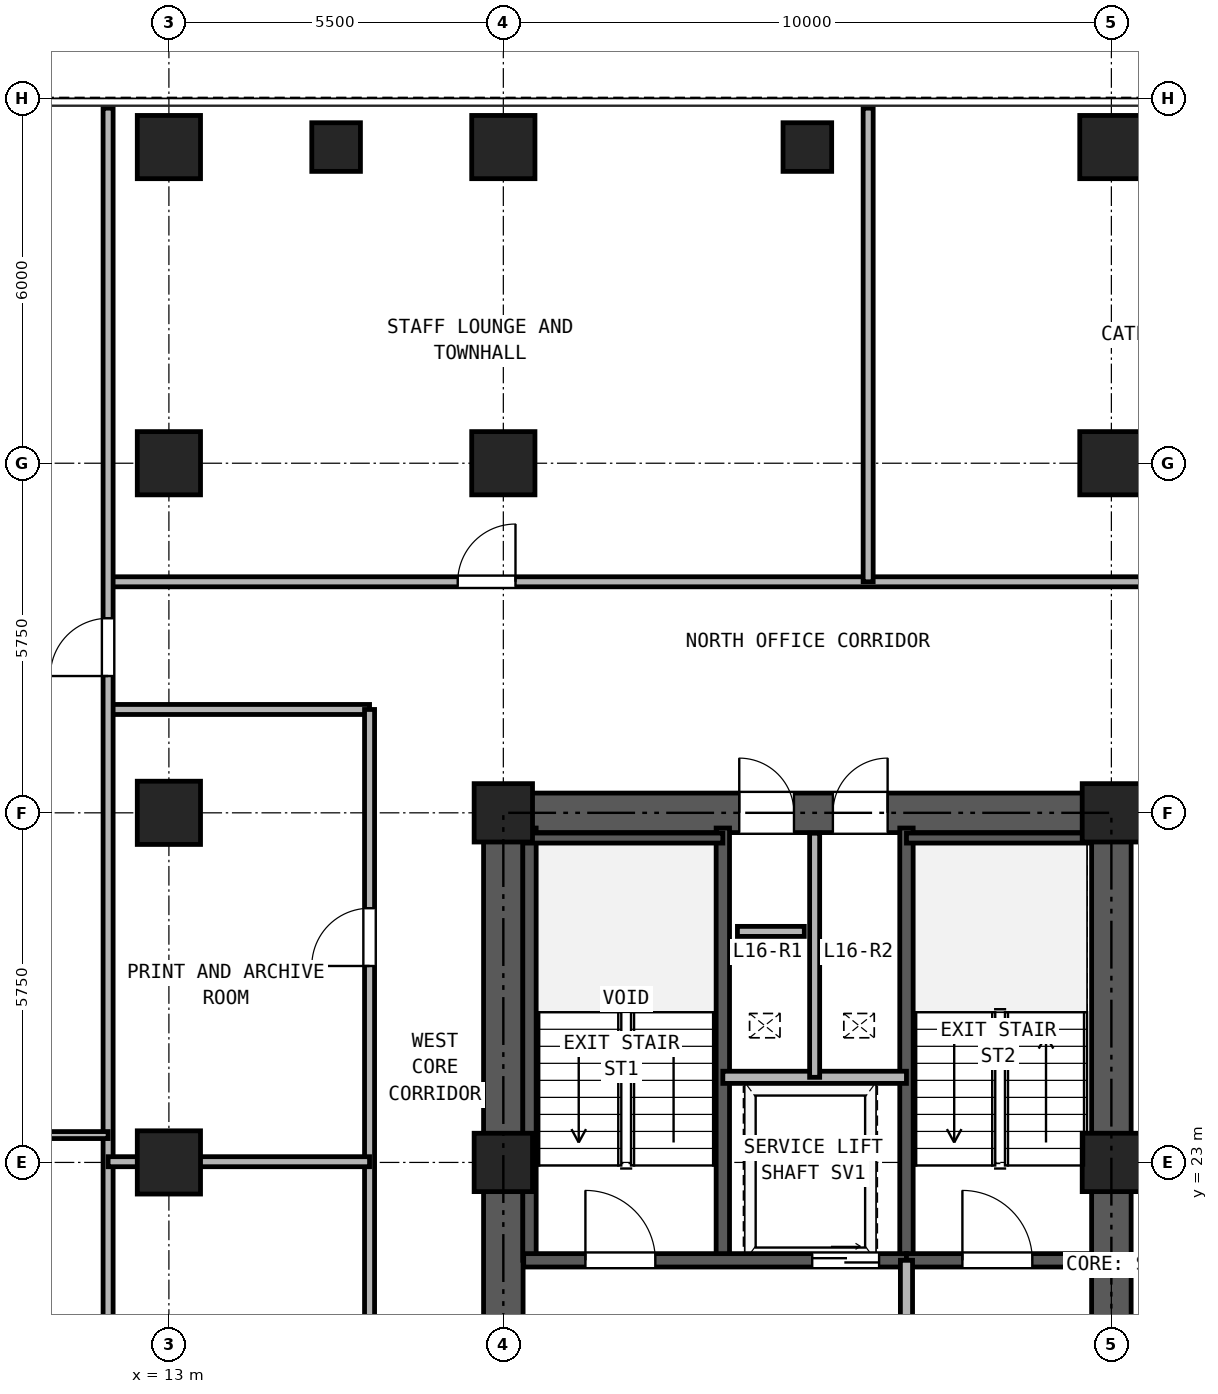
"""IFC4 building model, lengths in metres.
Left out: names, types, materials, properties, quantities, classifications, styles, units other than length and angle.
Written with IfcOpenShell. Run it as: python <this file> out.ifc"""

import sys

from ifc_helpers import new_model, si_unit, direction, frame, frame_2d, origin, origin_2d, place, context, subcontext, project, spatial, rectangle, hollow_rectangle, extrude, source, transform, mapped, element, fill, save


model = new_model("IFC4")
c1 = context("Model", 3, precision=1e-05, world=origin(), true_north=direction((0.0, 1.0)))
c2 = subcontext(c1, "Body", "Model", "MODEL_VIEW")
j1 = project(units=[si_unit("LENGTHUNIT", "METRE"), si_unit("PLANEANGLEUNIT", "RADIAN")], contexts=[c1])
p1 = place(None, origin())
s1 = spatial("IfcSite", under=j1, at=p1, CompositionType="ELEMENT")
p2 = place(p1, origin())
s2 = spatial("IfcBuilding", under=s1, at=p2, CompositionType="ELEMENT")
p3 = place(p2, frame((0.0, 0.0, 62.1)))
s3 = spatial("IfcBuildingStorey", under=s2, at=p3, CompositionType="ELEMENT", Elevation=62.1)
m1 = source(origin(), c2, "Body", "SweptSolid", [
    extrude(hollow_rectangle(XDim=1.04, YDim=1.04, WallThickness=0.065, at=origin_2d()), origin(), (0.0, 0.0, 1.0), 3.32),
])
for number, where, z_axis, x_axis in (
    (1, (13.0, 39.7, 0.0), (0.0, 0.0, 1.0), (1.0, 0.0, 0.0)),
    (2, (18.5, 39.7, 0.0), (0.0, 0.0, 1.0), (1.0, 0.0, 0.0)),
    (3, (28.5, 39.7, 0.0), (0.0, 0.0, 1.0), (1.0, 0.0, 0.0)),
    (4, (13.0, 23.0, 0.0), (0.0, 0.0, 1.0), (1.0, 0.0, 0.0)),
    (5, (13.0, 28.75, 0.0), (0.0, 0.0, 1.0), (1.0, 0.0, 0.0)),
    (6, (13.0, 34.5, 0.0), (0.0, 0.0, 1.0), (1.0, 0.0, 0.0)),
):
    element("IfcColumn", number, at=place(p3, frame(where, z_axis=z_axis, x_axis=x_axis)), inside=s3, PredefinedType="COLUMN", context=c2, shape_type="MappedRepresentation", body=[
        mapped(m1, transform((0.0, 0.0, 0.0), x_axis=(1.0, 0.0, 0.0), y_axis=(0.0, 1.0, 0.0), z_axis=(0.0, 0.0, 1.0), scale=1.0)),
    ])
m2 = source(origin(), c2, "Body", "SweptSolid", [
    extrude(hollow_rectangle(XDim=0.96, YDim=0.96, WallThickness=0.06, at=origin_2d()), origin(), (0.0, 0.0, 1.0), 3.32),
])
for number, where, z_axis, x_axis in (
    (7, (18.5, 23.0, 0.0), (0.0, 0.0, 1.0), (1.0, 0.0, 0.0)),
    (8, (18.5, 28.75, 0.0), (0.0, 0.0, 1.0), (1.0, 0.0, 0.0)),
):
    element("IfcColumn", number, at=place(p3, frame(where, z_axis=z_axis, x_axis=x_axis)), inside=s3, PredefinedType="COLUMN", context=c2, shape_type="MappedRepresentation", body=[
        mapped(m2, transform((0.0, 0.0, 0.0), x_axis=(1.0, 0.0, 0.0), y_axis=(0.0, 1.0, 0.0), z_axis=(0.0, 0.0, 1.0), scale=1.0)),
    ])
p4 = place(p3, frame((18.5, 34.5, 0.0), z_axis=(0.0, 0.0, 1.0), x_axis=(1.0, 0.0, 0.0)))
e9 = element("IfcColumn", 9, at=p4, inside=s3, PredefinedType="COLUMN", context=c2, shape_type="MappedRepresentation", body=[
    mapped(m1, transform((0.0, 0.0, 0.0), x_axis=(1.0, 0.0, 0.0), y_axis=(0.0, 1.0, 0.0), z_axis=(0.0, 0.0, 1.0), scale=1.0)),
])
for number, where, z_axis, x_axis in (
    (10, (28.5, 23.0, 0.0), (0.0, 0.0, 1.0), (1.0, 0.0, 0.0)),
    (11, (28.5, 28.75, 0.0), (0.0, 0.0, 1.0), (1.0, 0.0, 0.0)),
):
    element("IfcColumn", number, at=place(p3, frame(where, z_axis=z_axis, x_axis=x_axis)), inside=s3, PredefinedType="COLUMN", context=c2, shape_type="MappedRepresentation", body=[
        mapped(m2, transform((0.0, 0.0, 0.0), x_axis=(1.0, 0.0, 0.0), y_axis=(0.0, 1.0, 0.0), z_axis=(0.0, 0.0, 1.0), scale=1.0)),
    ])
p5 = place(p3, frame((28.5, 34.5, 0.0), z_axis=(0.0, 0.0, 1.0), x_axis=(1.0, 0.0, 0.0)))
e12 = element("IfcColumn", 12, at=p5, inside=s3, PredefinedType="COLUMN", context=c2, shape_type="MappedRepresentation", body=[
    mapped(m1, transform((0.0, 0.0, 0.0), x_axis=(1.0, 0.0, 0.0), y_axis=(0.0, 1.0, 0.0), z_axis=(0.0, 0.0, 1.0), scale=1.0)),
])
m3 = source(origin(), c2, "Body", "SweptSolid", [
    extrude(hollow_rectangle(XDim=0.8, YDim=0.8, WallThickness=0.045, at=origin_2d()), origin(), (0.0, 0.0, 1.0), 3.32),
])
for number, where, z_axis, x_axis in (
    (13, (15.75, 39.7, 0.0), (0.0, 0.0, 1.0), (1.0, 0.0, 0.0)),
    (14, (23.5, 39.7, 0.0), (0.0, 0.0, 1.0), (1.0, 0.0, 0.0)),
):
    element("IfcColumn", number, at=place(p3, frame(where, z_axis=z_axis, x_axis=x_axis)), inside=s3, PredefinedType="COLUMN", context=c2, shape_type="MappedRepresentation", body=[
        mapped(m3, transform((0.0, 0.0, 0.0), x_axis=(1.0, 0.0, 0.0), y_axis=(0.0, 1.0, 0.0), z_axis=(0.0, 0.0, 1.0), scale=1.0)),
    ])
p6 = place(p3, frame((18.175, 28.75, 0.0), z_axis=(0.0, 0.0, 1.0), x_axis=(1.0, 0.0, 0.0)))
e15 = element("IfcWall", 15, at=p6, inside=s3, PredefinedType="SHEAR", context=c2, shape_type="SweptSolid", body=[
    extrude(rectangle(XDim=10.65, YDim=0.65, at=frame_2d((5.325, 0.0))), origin(), (0.0, 0.0, 1.0), 3.32),
])
p7 = place(p6, frame((4.205, 0.0, 0.0)))
e16 = element("IfcOpeningElement", 16, at=p7, cuts=e15, PredefinedType="OPENING", context=c2, shape_type="SweptSolid", body=[
    extrude(rectangle(XDim=0.9, YDim=2.05, at=frame_2d((0.45, 1.025))), frame((0.0, 0.335, 0.0), z_axis=(0.0, -1.0, 0.0), x_axis=(1.0, 0.0, 0.0)), (0.0, 0.0, 1.0), 0.67),
])
p8 = place(p6, frame((5.745, 0.0, 0.0)))
e17 = element("IfcOpeningElement", 17, at=p8, cuts=e15, PredefinedType="OPENING", context=c2, shape_type="SweptSolid", body=[
    extrude(rectangle(XDim=0.9, YDim=2.05, at=frame_2d((0.45, 1.025))), frame((0.0, 0.335, 0.0), z_axis=(0.0, -1.0, 0.0), x_axis=(1.0, 0.0, 0.0)), (0.0, 0.0, 1.0), 0.67),
])
p9 = place(p3, frame((18.5, 11.825, 0.0), z_axis=(0.0, 0.0, 1.0), x_axis=(0.0, 1.0, 0.0)))
e18 = element("IfcWall", 18, at=p9, inside=s3, PredefinedType="SHEAR", context=c2, shape_type="SweptSolid", body=[
    extrude(rectangle(XDim=16.6, YDim=0.65, at=frame_2d((8.3, 0.0))), origin(), (0.0, 0.0, 1.0), 3.32),
])
p10 = place(p9, frame((7.325, 0.0, 0.0)))
e19 = element("IfcOpeningElement", 19, at=p10, cuts=e18, PredefinedType="OPENING", context=c2, shape_type="SweptSolid", body=[
    extrude(rectangle(XDim=1.15, YDim=2.2, at=frame_2d((0.575, 1.1))), frame((0.0, 0.335, 0.0), z_axis=(0.0, -1.0, 0.0), x_axis=(1.0, 0.0, 0.0)), (0.0, 0.0, 1.0), 0.67),
])
p11 = place(p3, frame((28.5, 11.825, 0.0), z_axis=(0.0, 0.0, 1.0), x_axis=(0.0, 1.0, 0.0)))
e20 = element("IfcWall", 20, at=p11, inside=s3, PredefinedType="SHEAR", context=c2, shape_type="SweptSolid", body=[
    extrude(rectangle(XDim=16.6, YDim=0.65, at=frame_2d((8.3, 0.0))), origin(), (0.0, 0.0, 1.0), 3.32),
])
p12 = place(p11, frame((7.325, 0.0, 0.0)))
e21 = element("IfcOpeningElement", 21, at=p12, cuts=e20, PredefinedType="OPENING", context=c2, shape_type="SweptSolid", body=[
    extrude(rectangle(XDim=1.15, YDim=2.2, at=frame_2d((0.575, 1.1))), frame((0.0, 0.335, 0.0), z_axis=(0.0, -1.0, 0.0), x_axis=(1.0, 0.0, 0.0)), (0.0, 0.0, 1.0), 0.67),
])
for number, where, z_axis, x_axis in (
    (22, (18.93, 21.39, 0.0), (0.0, 0.0, 1.0), (0.0, 1.0, 0.0)),
    (23, (22.11, 21.39, 0.0), (0.0, 0.0, 1.0), (0.0, 1.0, 0.0)),
    (24, (25.13, 21.39, 0.0), (0.0, 0.0, 1.0), (0.0, 1.0, 0.0)),
):
    element("IfcWall", number, at=place(p3, frame(where, z_axis=z_axis, x_axis=x_axis)), inside=s3, PredefinedType="SOLIDWALL", context=c2, shape_type="SweptSolid", body=[
        extrude(rectangle(XDim=7.11, YDim=0.22, at=frame_2d((3.555, 0.0))), origin(), (0.0, 0.0, 1.0), 3.32),
    ])
p13 = place(p3, frame((18.835, 28.335, 0.0), z_axis=(0.0, 0.0, 1.0), x_axis=(1.0, 0.0, 0.0)))
e25 = element("IfcWall", 25, at=p13, inside=s3, PredefinedType="PARTITIONING", context=c2, shape_type="SweptSolid", body=[
    extrude(rectangle(XDim=3.275, YDim=0.165, at=frame_2d((1.638, 0.0))), origin(), (0.0, 0.0, 1.0), 3.32),
])
p14 = place(p3, frame((25.13, 28.335, 0.0), z_axis=(0.0, 0.0, 1.0), x_axis=(1.0, 0.0, 0.0)))
e26 = element("IfcWall", 26, at=p14, inside=s3, PredefinedType="PARTITIONING", context=c2, shape_type="SweptSolid", body=[
    extrude(rectangle(XDim=3.035, YDim=0.165, at=frame_2d((1.518, 0.0))), origin(), (0.0, 0.0, 1.0), 3.32),
])
p15 = place(p3, frame((18.835, 21.39, 0.0), z_axis=(0.0, 0.0, 1.0), x_axis=(1.0, 0.0, 0.0)))
e27 = element("IfcWall", 27, at=p15, inside=s3, PredefinedType="SOLIDWALL", context=c2, shape_type="SweptSolid", body=[
    extrude(rectangle(XDim=6.295, YDim=0.22, at=frame_2d((3.147, 0.0))), origin(), (0.0, 0.0, 1.0), 3.32),
])
p16 = place(p15, frame((1.015, 0.0, 0.0)))
e28 = element("IfcOpeningElement", 28, at=p16, cuts=e27, PredefinedType="OPENING", context=c2, shape_type="SweptSolid", body=[
    extrude(rectangle(XDim=1.15, YDim=2.2, at=frame_2d((0.575, 1.1))), frame((0.0, 0.12, 0.0), z_axis=(0.0, -1.0, 0.0), x_axis=(1.0, 0.0, 0.0)), (0.0, 0.0, 1.0), 0.24),
])
p17 = place(p15, frame((4.745, 0.0, 0.0)))
e29 = element("IfcOpeningElement", 29, at=p17, cuts=e27, PredefinedType="OPENING", context=c2, shape_type="SweptSolid", body=[
    extrude(rectangle(XDim=1.1, YDim=2.25, at=frame_2d((0.55, 1.125))), frame((0.0, 0.12, 0.0), z_axis=(0.0, -1.0, 0.0), x_axis=(1.0, 0.0, 0.0)), (0.0, 0.0, 1.0), 0.24),
])
p18 = place(p3, frame((25.13, 21.39, 0.0), z_axis=(0.0, 0.0, 1.0), x_axis=(1.0, 0.0, 0.0)))
e30 = element("IfcWall", 30, at=p18, inside=s3, PredefinedType="SOLIDWALL", context=c2, shape_type="SweptSolid", body=[
    extrude(rectangle(XDim=3.035, YDim=0.22, at=frame_2d((1.518, 0.0))), origin(), (0.0, 0.0, 1.0), 3.32),
])
p19 = place(p18, frame((0.92, 0.0, 0.0)))
e31 = element("IfcOpeningElement", 31, at=p19, cuts=e30, PredefinedType="OPENING", context=c2, shape_type="SweptSolid", body=[
    extrude(rectangle(XDim=1.15, YDim=2.2, at=frame_2d((0.575, 1.1))), frame((0.0, 0.12, 0.0), z_axis=(0.0, -1.0, 0.0), x_axis=(1.0, 0.0, 0.0)), (0.0, 0.0, 1.0), 0.24),
])
p20 = place(p3, frame((22.11, 24.4, 0.0), z_axis=(0.0, 0.0, 1.0), x_axis=(1.0, 0.0, 0.0)))
e32 = element("IfcWall", 32, at=p20, inside=s3, PredefinedType="PARTITIONING", context=c2, shape_type="SweptSolid", body=[
    extrude(rectangle(XDim=3.02, YDim=0.2, at=frame_2d((1.51, 0.0))), origin(), (0.0, 0.0, 1.0), 3.32),
])
p21 = place(p3, frame((23.62, 24.4, 0.0), z_axis=(0.0, 0.0, 1.0), x_axis=(0.0, 1.0, 0.0)))
e33 = element("IfcWall", 33, at=p21, inside=s3, PredefinedType="PARTITIONING", context=c2, shape_type="SweptSolid", body=[
    extrude(rectangle(XDim=4.015, YDim=0.165, at=frame_2d((2.008, 0.0))), origin(), (0.0, 0.0, 1.0), 3.32),
])
p22 = place(p3, frame((25.13, 18.0, 0.0), z_axis=(0.0, 0.0, 1.0), x_axis=(0.0, 1.0, 0.0)))
e34 = element("IfcWall", 34, at=p22, inside=s3, PredefinedType="PARTITIONING", context=c2, shape_type="SweptSolid", body=[
    extrude(rectangle(XDim=3.39, YDim=0.2, at=frame_2d((1.695, 0.0))), origin(), (0.0, 0.0, 1.0), 3.32),
])
p23 = place(p22, frame((1.1, 0.0, 0.0)))
e35 = element("IfcOpeningElement", 35, at=p23, cuts=e34, PredefinedType="OPENING", context=c2, shape_type="SweptSolid", body=[
    extrude(rectangle(XDim=1.15, YDim=2.2, at=frame_2d((0.575, 1.1))), frame((0.0, 0.11, 0.0), z_axis=(0.0, -1.0, 0.0), x_axis=(1.0, 0.0, 0.0)), (0.0, 0.0, 1.0), 0.22),
])
p24 = place(p3, frame((12.0, 32.55, 0.0), z_axis=(0.0, 0.0, 1.0), x_axis=(1.0, 0.0, 0.0)))
e36 = element("IfcWall", 36, at=p24, inside=s3, PredefinedType="PARTITIONING", context=c2, shape_type="SweptSolid", body=[
    extrude(rectangle(XDim=23.0, YDim=0.165, at=frame_2d((11.5, 0.0))), origin(), (0.0, 0.0, 1.0), 3.32),
])
p25 = place(p24, frame((5.75, 0.0, 0.0)))
e37 = element("IfcOpeningElement", 37, at=p25, cuts=e36, PredefinedType="OPENING", context=c2, shape_type="SweptSolid", body=[
    extrude(rectangle(XDim=0.95, YDim=2.15, at=frame_2d((0.475, 1.075))), frame((0.0, 0.093, 0.0), z_axis=(0.0, -1.0, 0.0), x_axis=(1.0, 0.0, 0.0)), (0.0, 0.0, 1.0), 0.185),
])
p26 = place(p24, frame((17.25, 0.0, 0.0)))
e38 = element("IfcOpeningElement", 38, at=p26, cuts=e36, PredefinedType="OPENING", context=c2, shape_type="SweptSolid", body=[
    extrude(rectangle(XDim=0.95, YDim=2.15, at=frame_2d((0.475, 1.075))), frame((0.0, 0.093, 0.0), z_axis=(0.0, -1.0, 0.0), x_axis=(1.0, 0.0, 0.0)), (0.0, 0.0, 1.0), 0.185),
])
p27 = place(p3, frame((12.0, 30.45, 0.0), z_axis=(0.0, 0.0, 1.0), x_axis=(1.0, 0.0, 0.0)))
e39 = element("IfcWall", 39, at=p27, inside=s3, PredefinedType="PARTITIONING", context=c2, shape_type="SweptSolid", body=[
    extrude(rectangle(XDim=4.3, YDim=0.165, at=frame_2d((2.15, 0.0))), origin(), (0.0, 0.0, 1.0), 3.32),
])
p28 = place(p3, frame((16.3, 9.55, 0.0), z_axis=(0.0, 0.0, 1.0), x_axis=(0.0, 1.0, 0.0)))
e40 = element("IfcWall", 40, at=p28, inside=s3, PredefinedType="PARTITIONING", context=c2, shape_type="SweptSolid", body=[
    extrude(rectangle(XDim=20.9, YDim=0.165, at=frame_2d((10.45, 0.0))), origin(), (0.0, 0.0, 1.0), 3.32),
])
p29 = place(p28, frame((6.231, 0.0, 0.0)))
e41 = element("IfcOpeningElement", 41, at=p29, cuts=e40, PredefinedType="OPENING", context=c2, shape_type="SweptSolid", body=[
    extrude(rectangle(XDim=0.95, YDim=2.15, at=frame_2d((0.475, 1.075))), frame((0.0, 0.093, 0.0), z_axis=(0.0, -1.0, 0.0), x_axis=(1.0, 0.0, 0.0)), (0.0, 0.0, 1.0), 0.185),
])
p30 = place(p28, frame((16.681, 0.0, 0.0)))
e42 = element("IfcOpeningElement", 42, at=p30, cuts=e40, PredefinedType="OPENING", context=c2, shape_type="SweptSolid", body=[
    extrude(rectangle(XDim=0.95, YDim=2.15, at=frame_2d((0.475, 1.075))), frame((0.0, 0.093, 0.0), z_axis=(0.0, -1.0, 0.0), x_axis=(1.0, 0.0, 0.0)), (0.0, 0.0, 1.0), 0.185),
])
p31 = place(p3, frame((12.0, 0.16, 0.0), z_axis=(0.0, 0.0, 1.0), x_axis=(0.0, 1.0, 0.0)))
e43 = element("IfcWall", 43, at=p31, inside=s3, PredefinedType="PARTITIONING", context=c2, shape_type="SweptSolid", body=[
    extrude(rectangle(XDim=40.18, YDim=0.165, at=frame_2d((20.09, 0.0))), origin(), (0.0, 0.0, 1.0), 3.32),
])
p32 = place(p31, frame((7.84, 0.0, 0.0)))
e44 = element("IfcOpeningElement", 44, at=p32, cuts=e43, PredefinedType="OPENING", context=c2, shape_type="SweptSolid", body=[
    extrude(rectangle(XDim=0.95, YDim=2.15, at=frame_2d((0.475, 1.075))), frame((0.0, 0.093, 0.0), z_axis=(0.0, -1.0, 0.0), x_axis=(1.0, 0.0, 0.0)), (0.0, 0.0, 1.0), 0.185),
])
p33 = place(p31, frame((30.84, 0.0, 0.0)))
e45 = element("IfcOpeningElement", 45, at=p33, cuts=e43, PredefinedType="OPENING", context=c2, shape_type="SweptSolid", body=[
    extrude(rectangle(XDim=0.95, YDim=2.15, at=frame_2d((0.475, 1.075))), frame((0.0, 0.093, 0.0), z_axis=(0.0, -1.0, 0.0), x_axis=(1.0, 0.0, 0.0)), (0.0, 0.0, 1.0), 0.185),
])
p34 = place(p3, frame((24.5, 32.55, 0.0), z_axis=(0.0, 0.0, 1.0), x_axis=(0.0, 1.0, 0.0)))
e46 = element("IfcWall", 46, at=p34, inside=s3, PredefinedType="PARTITIONING", context=c2, shape_type="SweptSolid", body=[
    extrude(rectangle(XDim=7.79, YDim=0.165, at=frame_2d((3.895, 0.0))), origin(), (0.0, 0.0, 1.0), 3.32),
])
p35 = place(p3, frame((0.16, 23.45, 0.0), z_axis=(0.0, 0.0, 1.0), x_axis=(1.0, 0.0, 0.0)))
e47 = element("IfcWall", 47, at=p35, inside=s3, PredefinedType="PARTITIONING", context=c2, shape_type="SweptSolid", body=[
    extrude(rectangle(XDim=11.84, YDim=0.115, at=frame_2d((5.92, 0.0))), origin(), (0.0, 0.0, 1.0), 3.32),
])
p36 = place(p3, frame((12.0, 23.012, 0.0), z_axis=(0.0, 0.0, 1.0), x_axis=(1.0, 0.0, 0.0)))
e48 = element("IfcWall", 48, at=p36, inside=s3, PredefinedType="PARTITIONING", context=c2, shape_type="SweptSolid", body=[
    extrude(rectangle(XDim=4.3, YDim=0.165, at=frame_2d((2.15, 0.0))), origin(), (0.0, 0.0, 1.0), 2.539),
])
p37 = place(p3, frame((22.35, 26.8, 0.0), z_axis=(0.0, 0.0, 1.0), x_axis=(1.0, 0.0, 0.0)))
e49 = element("IfcWall", 49, at=p37, inside=s3, PredefinedType="PARTITIONING", context=c2, shape_type="SweptSolid", body=[
    extrude(rectangle(XDim=1.1, YDim=0.165, at=frame_2d((0.55, 0.0))), origin(), (0.0, 0.0, 1.0), 3.32),
])
p38 = place(p16, frame((1.15, 0.0, 0.0), z_axis=(0.0, 0.0, 1.0), x_axis=(-1.0, 0.0, 0.0)))
e50 = element("IfcDoor", 50, at=p38, inside=s3, OperationType="SINGLE_SWING_LEFT", PredefinedType="DOOR", context=c2, shape_type="SweptSolid", body=[
    extrude(rectangle(XDim=1.15, YDim=2.2, at=frame_2d((0.575, 1.1))), frame((0.0, 0.025, 0.0), z_axis=(0.0, -1.0, 0.0), x_axis=(1.0, 0.0, 0.0)), (0.0, 0.0, 1.0), 0.05),
])
fill(e28, e50)
p39 = place(p19, frame((1.15, 0.0, 0.0), z_axis=(0.0, 0.0, 1.0), x_axis=(-1.0, 0.0, 0.0)))
e51 = element("IfcDoor", 51, at=p39, inside=s3, OperationType="SINGLE_SWING_LEFT", PredefinedType="DOOR", context=c2, shape_type="SweptSolid", body=[
    extrude(rectangle(XDim=1.15, YDim=2.2, at=frame_2d((0.575, 1.1))), frame((0.0, 0.025, 0.0), z_axis=(0.0, -1.0, 0.0), x_axis=(1.0, 0.0, 0.0)), (0.0, 0.0, 1.0), 0.05),
])
fill(e31, e51)
p40 = place(p17, frame((1.1, 0.0, 0.0), z_axis=(0.0, 0.0, 1.0), x_axis=(-1.0, 0.0, 0.0)))
e52 = element("IfcDoor", 52, at=p40, inside=s3, OperationType="DOUBLE_DOOR_SLIDING", PredefinedType="DOOR", context=c2, shape_type="SweptSolid", body=[
    extrude(rectangle(XDim=1.1, YDim=2.25, at=frame_2d((0.55, 1.125))), frame((0.0, 0.025, 0.0), z_axis=(0.0, -1.0, 0.0), x_axis=(1.0, 0.0, 0.0)), (0.0, 0.0, 1.0), 0.05),
])
fill(e29, e52)
p41 = place(p7, origin())
e53 = element("IfcDoor", 53, at=p41, inside=s3, OperationType="SINGLE_SWING_LEFT", PredefinedType="DOOR", context=c2, shape_type="SweptSolid", body=[
    extrude(rectangle(XDim=0.9, YDim=2.05, at=frame_2d((0.45, 1.025))), frame((0.0, 0.025, 0.0), z_axis=(0.0, -1.0, 0.0), x_axis=(1.0, 0.0, 0.0)), (0.0, 0.0, 1.0), 0.05),
])
fill(e16, e53)
p42 = place(p8, origin())
e54 = element("IfcDoor", 54, at=p42, inside=s3, OperationType="SINGLE_SWING_RIGHT", PredefinedType="DOOR", context=c2, shape_type="SweptSolid", body=[
    extrude(rectangle(XDim=0.9, YDim=2.05, at=frame_2d((0.45, 1.025))), frame((0.0, 0.025, 0.0), z_axis=(0.0, -1.0, 0.0), x_axis=(1.0, 0.0, 0.0)), (0.0, 0.0, 1.0), 0.05),
])
fill(e17, e54)
p43 = place(p25, origin())
e55 = element("IfcDoor", 55, at=p43, inside=s3, OperationType="SINGLE_SWING_RIGHT", PredefinedType="DOOR", context=c2, shape_type="SweptSolid", body=[
    extrude(rectangle(XDim=0.95, YDim=2.15, at=frame_2d((0.475, 1.075))), frame((0.0, 0.025, 0.0), z_axis=(0.0, -1.0, 0.0), x_axis=(1.0, 0.0, 0.0)), (0.0, 0.0, 1.0), 0.05),
])
fill(e37, e55)
p44 = place(p33, frame((0.95, 0.0, 0.0), z_axis=(0.0, 0.0, 1.0), x_axis=(-1.0, 0.0, 0.0)))
e56 = element("IfcDoor", 56, at=p44, inside=s3, OperationType="SINGLE_SWING_LEFT", PredefinedType="DOOR", context=c2, shape_type="SweptSolid", body=[
    extrude(rectangle(XDim=0.95, YDim=2.15, at=frame_2d((0.475, 1.075))), frame((0.0, 0.025, 0.0), z_axis=(0.0, -1.0, 0.0), x_axis=(1.0, 0.0, 0.0)), (0.0, 0.0, 1.0), 0.05),
])
fill(e45, e56)
p45 = place(p30, frame((0.95, 0.0, 0.0), z_axis=(0.0, 0.0, 1.0), x_axis=(-1.0, 0.0, 0.0)))
e57 = element("IfcDoor", 57, at=p45, inside=s3, OperationType="SINGLE_SWING_LEFT", PredefinedType="DOOR", context=c2, shape_type="SweptSolid", body=[
    extrude(rectangle(XDim=0.95, YDim=2.15, at=frame_2d((0.475, 1.075))), frame((0.0, 0.025, 0.0), z_axis=(0.0, -1.0, 0.0), x_axis=(1.0, 0.0, 0.0)), (0.0, 0.0, 1.0), 0.05),
])
fill(e42, e57)
save(model, sys.argv[1])
